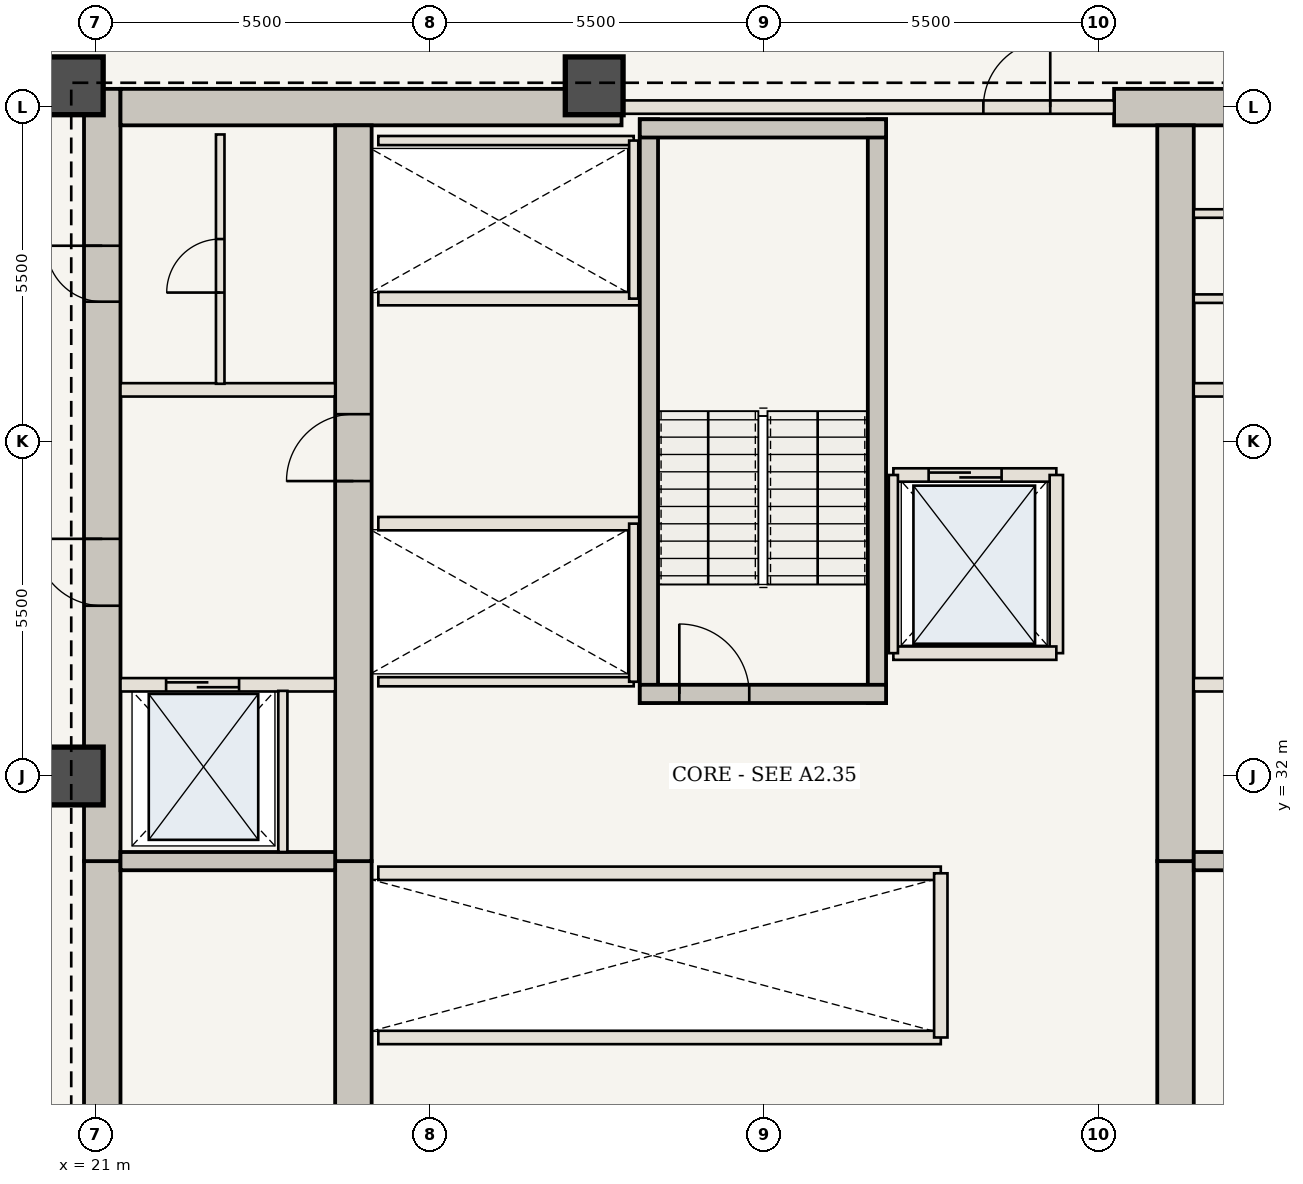
"""IFC4 building model, lengths in metres.
Left out: names, types, materials, properties, quantities, classifications, styles, units other than length and angle.
Written with IfcOpenShell. Run it as: python <this file> out.ifc"""

import sys

from ifc_helpers import new_model, si_unit, direction, frame, frame_2d, origin, origin_2d, place, context, subcontext, project, spatial, rectangle, extrude, element, fill, save


model = new_model("IFC4")
c1 = context("Model", 3, precision=1e-05, world=origin(), true_north=direction((0.0, 1.0)))
c2 = subcontext(c1, "Body", "Model", "MODEL_VIEW")
j1 = project(units=[si_unit("LENGTHUNIT", "METRE"), si_unit("PLANEANGLEUNIT", "RADIAN")], contexts=[c1])
p1 = place(None, origin())
s1 = spatial("IfcSite", under=j1, at=p1, CompositionType="ELEMENT")
p2 = place(p1, origin())
s2 = spatial("IfcBuilding", under=s1, at=p2, CompositionType="ELEMENT")
p3 = place(p2, frame((0.0, 0.0, 152.95)))
s3 = spatial("IfcBuildingStorey", under=s2, at=p3, CompositionType="ELEMENT", Elevation=152.95)
p4 = place(p3, frame((21.11, 20.65, 0.0), z_axis=(0.0, 0.0, 1.0), x_axis=(0.0, 1.0, 0.0)))
e1 = element("IfcWall", 1, at=p4, inside=s3, PredefinedType="SHEAR", context=c2, shape_type="SweptSolid", body=[
    extrude(rectangle(XDim=9.95, YDim=0.6, at=frame_2d((4.975, 0.0))), origin(), (0.0, 0.0, 1.0), 3.85),
])
p5 = place(p4, frame((1.1, 0.0, 0.0)))
e2 = element("IfcOpeningElement", 2, at=p5, cuts=e1, PredefinedType="OPENING", context=c2, shape_type="SweptSolid", body=[
    extrude(rectangle(XDim=1.15, YDim=2.15, at=frame_2d((0.575, 1.075))), frame((0.0, 0.31, 0.0), z_axis=(0.0, -1.0, 0.0), x_axis=(1.0, 0.0, 0.0)), (0.0, 0.0, 1.0), 0.62),
])
p6 = place(p3, frame((21.11, 30.6, 0.0), z_axis=(0.0, 0.0, 1.0), x_axis=(0.0, 1.0, 0.0)))
e3 = element("IfcWall", 3, at=p6, inside=s3, PredefinedType="SHEAR", context=c2, shape_type="SweptSolid", body=[
    extrude(rectangle(XDim=12.7, YDim=0.6, at=frame_2d((6.35, 0.0))), origin(), (0.0, 0.0, 1.0), 3.85),
])
p7 = place(p6, frame((4.2, 0.0, 0.0)))
e4 = element("IfcOpeningElement", 4, at=p7, cuts=e3, PredefinedType="OPENING", context=c2, shape_type="SweptSolid", body=[
    extrude(rectangle(XDim=1.1, YDim=2.15, at=frame_2d((0.55, 1.075))), frame((0.0, 0.31, 0.0), z_axis=(0.0, -1.0, 0.0), x_axis=(1.0, 0.0, 0.0)), (0.0, 0.0, 1.0), 0.62),
])
p8 = place(p6, frame((9.2, 0.0, 0.0)))
e5 = element("IfcOpeningElement", 5, at=p8, cuts=e3, PredefinedType="OPENING", context=c2, shape_type="SweptSolid", body=[
    extrude(rectangle(XDim=0.92, YDim=2.1, at=frame_2d((0.46, 1.05))), frame((0.0, 0.31, 0.0), z_axis=(0.0, -1.0, 0.0), x_axis=(1.0, 0.0, 0.0)), (0.0, 0.0, 1.0), 0.62),
])
p9 = place(p3, frame((21.41, 43.0, 0.0), z_axis=(0.0, 0.0, 1.0), x_axis=(1.0, 0.0, 0.0)))
e6 = element("IfcWall", 6, at=p9, inside=s3, PredefinedType="SHEAR", context=c2, shape_type="SweptSolid", body=[
    extrude(rectangle(XDim=8.24, YDim=0.6, at=frame_2d((4.12, 0.0))), origin(), (0.0, 0.0, 1.0), 3.85),
])
p10 = place(p3, frame((37.75, 43.0, 0.0), z_axis=(0.0, 0.0, 1.0), x_axis=(1.0, 0.0, 0.0)))
e7 = element("IfcWall", 7, at=p10, inside=s3, PredefinedType="SHEAR", context=c2, shape_type="SweptSolid", body=[
    extrude(rectangle(XDim=4.84, YDim=0.6, at=frame_2d((2.42, 0.0))), origin(), (0.0, 0.0, 1.0), 3.85),
])
p11 = place(p3, frame((25.24, 21.25, 0.0), z_axis=(0.0, 0.0, 1.0), x_axis=(0.0, 1.0, 0.0)))
e8 = element("IfcWall", 8, at=p11, inside=s3, PredefinedType="SHEAR", context=c2, shape_type="SweptSolid", body=[
    extrude(rectangle(XDim=9.35, YDim=0.6, at=frame_2d((4.675, 0.0))), origin(), (0.0, 0.0, 1.0), 3.85),
])
p12 = place(p3, frame((25.24, 30.6, 0.0), z_axis=(0.0, 0.0, 1.0), x_axis=(0.0, 1.0, 0.0)))
e9 = element("IfcWall", 9, at=p12, inside=s3, PredefinedType="SHEAR", context=c2, shape_type="SweptSolid", body=[
    extrude(rectangle(XDim=12.1, YDim=0.6, at=frame_2d((6.05, 0.0))), origin(), (0.0, 0.0, 1.0), 3.85),
])
p13 = place(p12, frame((6.25, 0.0, 0.0)))
e10 = element("IfcOpeningElement", 10, at=p13, cuts=e9, PredefinedType="OPENING", context=c2, shape_type="SweptSolid", body=[
    extrude(rectangle(XDim=1.1, YDim=2.15, at=frame_2d((0.55, 1.075))), frame((0.0, 0.31, 0.0), z_axis=(0.0, -1.0, 0.0), x_axis=(1.0, 0.0, 0.0)), (0.0, 0.0, 1.0), 0.62),
])
p14 = place(p3, frame((38.76, 21.25, 0.0), z_axis=(0.0, 0.0, 1.0), x_axis=(0.0, 1.0, 0.0)))
e11 = element("IfcWall", 11, at=p14, inside=s3, PredefinedType="SHEAR", context=c2, shape_type="SweptSolid", body=[
    extrude(rectangle(XDim=9.35, YDim=0.6, at=frame_2d((4.675, 0.0))), origin(), (0.0, 0.0, 1.0), 3.85),
])
p15 = place(p3, frame((38.76, 30.6, 0.0), z_axis=(0.0, 0.0, 1.0), x_axis=(0.0, 1.0, 0.0)))
e12 = element("IfcWall", 12, at=p15, inside=s3, PredefinedType="SHEAR", context=c2, shape_type="SweptSolid", body=[
    extrude(rectangle(XDim=12.1, YDim=0.6, at=frame_2d((6.05, 0.0))), origin(), (0.0, 0.0, 1.0), 3.85),
])
for number, where, z_axis, x_axis in (
    (13, (29.2, 43.35, 0.0), (0.0, 0.0, 1.0), (1.0, 0.0, 0.0)),
    (14, (20.65, 43.35, 0.0), (0.0, 0.0, 1.0), (1.0, 0.0, 0.0)),
    (15, (20.65, 32.0, 0.0), (0.0, 0.0, 1.0), (1.0, 0.0, 0.0)),
):
    element("IfcColumn", number, at=place(p3, frame(where, z_axis=z_axis, x_axis=x_axis)), inside=s3, PredefinedType="COLUMN", context=c2, shape_type="SweptSolid", body=[
        extrude(rectangle(XDim=0.95, YDim=0.95, at=origin_2d()), origin(), (0.0, 0.0, 1.0), 3.85),
    ])
for number, where, z_axis, x_axis in (
    (16, (21.41, 30.6, 0.0), (0.0, 0.0, 1.0), (1.0, 0.0, 0.0)),
    (17, (39.06, 30.6, 0.0), (0.0, 0.0, 1.0), (1.0, 0.0, 0.0)),
):
    element("IfcWall", number, at=place(p3, frame(where, z_axis=z_axis, x_axis=x_axis)), inside=s3, PredefinedType="SHEAR", context=c2, shape_type="SweptSolid", body=[
        extrude(rectangle(XDim=3.53, YDim=0.3, at=frame_2d((1.765, 0.0))), origin(), (0.0, 0.0, 1.0), 3.685),
    ])
p16 = place(p3, frame((21.41, 33.5, 0.0), z_axis=(0.0, 0.0, 1.0), x_axis=(1.0, 0.0, 0.0)))
e18 = element("IfcWall", 18, at=p16, inside=s3, PredefinedType="STANDARD", context=c2, shape_type="SweptSolid", body=[
    extrude(rectangle(XDim=3.53, YDim=0.22, at=frame_2d((1.765, 0.0))), origin(), (0.0, 0.0, 1.0), 3.685),
])
p17 = place(p16, frame((0.75, 0.0, 0.0)))
e19 = element("IfcOpeningElement", 19, at=p17, cuts=e18, PredefinedType="OPENING", context=c2, shape_type="SweptSolid", body=[
    extrude(rectangle(XDim=1.2, YDim=2.2, at=frame_2d((0.6, 1.1))), frame((0.0, 0.12, 0.0), z_axis=(0.0, -1.0, 0.0), x_axis=(1.0, 0.0, 0.0)), (0.0, 0.0, 1.0), 0.24),
])
p18 = place(p3, frame((24.08, 30.75, 0.0), z_axis=(0.0, 0.0, 1.0), x_axis=(0.0, 1.0, 0.0)))
e20 = element("IfcWall", 20, at=p18, inside=s3, PredefinedType="STANDARD", context=c2, shape_type="SweptSolid", body=[
    extrude(rectangle(XDim=2.65, YDim=0.15, at=frame_2d((1.325, 0.0))), origin(), (0.0, 0.0, 1.0), 3.685),
])
p19 = place(p3, frame((39.06, 33.5, 0.0), z_axis=(0.0, 0.0, 1.0), x_axis=(1.0, 0.0, 0.0)))
e21 = element("IfcWall", 21, at=p19, inside=s3, PredefinedType="STANDARD", context=c2, shape_type="SweptSolid", body=[
    extrude(rectangle(XDim=3.53, YDim=0.22, at=frame_2d((1.765, 0.0))), origin(), (0.0, 0.0, 1.0), 3.685),
])
p20 = place(p19, frame((1.55, 0.0, 0.0)))
e22 = element("IfcOpeningElement", 22, at=p20, cuts=e21, PredefinedType="OPENING", context=c2, shape_type="SweptSolid", body=[
    extrude(rectangle(XDim=1.2, YDim=2.2, at=frame_2d((0.6, 1.1))), frame((0.0, 0.12, 0.0), z_axis=(0.0, -1.0, 0.0), x_axis=(1.0, 0.0, 0.0)), (0.0, 0.0, 1.0), 0.24),
])
for number, where, z_axis, x_axis in (
    (23, (21.41, 38.35, 0.0), (0.0, 0.0, 1.0), (1.0, 0.0, 0.0)),
    (24, (39.06, 38.35, 0.0), (0.0, 0.0, 1.0), (1.0, 0.0, 0.0)),
):
    element("IfcWall", number, at=place(p3, frame(where, z_axis=z_axis, x_axis=x_axis)), inside=s3, PredefinedType="STANDARD", context=c2, shape_type="SweptSolid", body=[
        extrude(rectangle(XDim=3.53, YDim=0.22, at=frame_2d((1.765, 0.0))), origin(), (0.0, 0.0, 1.0), 3.685),
    ])
p21 = place(p3, frame((23.05, 38.45, 0.0), z_axis=(0.0, 0.0, 1.0), x_axis=(0.0, 1.0, 0.0)))
e25 = element("IfcWall", 25, at=p21, inside=s3, PredefinedType="STANDARD", context=c2, shape_type="SweptSolid", body=[
    extrude(rectangle(XDim=4.1, YDim=0.14, at=frame_2d((2.05, 0.0))), origin(), (0.0, 0.0, 1.0), 3.685),
])
p22 = place(p21, frame((1.5, 0.0, 0.0)))
e26 = element("IfcOpeningElement", 26, at=p22, cuts=e25, PredefinedType="OPENING", context=c2, shape_type="SweptSolid", body=[
    extrude(rectangle(XDim=0.88, YDim=2.1, at=frame_2d((0.44, 1.05))), frame((0.0, 0.08, 0.0), z_axis=(0.0, -1.0, 0.0), x_axis=(1.0, 0.0, 0.0)), (0.0, 0.0, 1.0), 0.16),
])
for number, where, z_axis, x_axis in (
    (27, (39.06, 39.85, 0.0), (0.0, 0.0, 1.0), (1.0, 0.0, 0.0)),
    (28, (39.06, 41.25, 0.0), (0.0, 0.0, 1.0), (1.0, 0.0, 0.0)),
):
    element("IfcWall", number, at=place(p3, frame(where, z_axis=z_axis, x_axis=x_axis)), inside=s3, PredefinedType="STANDARD", context=c2, shape_type="SweptSolid", body=[
        extrude(rectangle(XDim=3.53, YDim=0.14, at=frame_2d((1.765, 0.0))), origin(), (0.0, 0.0, 1.0), 3.685),
    ])
for number, where, z_axis, x_axis in (
    (29, (25.65, 27.7, 0.0), (0.0, 0.0, 1.0), (1.0, 0.0, 0.0)),
    (30, (25.65, 30.4, 0.0), (0.0, 0.0, 1.0), (1.0, 0.0, 0.0)),
):
    element("IfcWall", number, at=place(p3, frame(where, z_axis=z_axis, x_axis=x_axis)), inside=s3, PredefinedType="STANDARD", context=c2, shape_type="SweptSolid", body=[
        extrude(rectangle(XDim=9.25, YDim=0.22, at=frame_2d((4.625, 0.0))), origin(), (0.0, 0.0, 1.0), 3.685),
    ])
p23 = place(p3, frame((34.9, 27.7, 0.0), z_axis=(0.0, 0.0, 1.0), x_axis=(0.0, 1.0, 0.0)))
e31 = element("IfcWall", 31, at=p23, inside=s3, PredefinedType="STANDARD", context=c2, shape_type="SweptSolid", body=[
    extrude(rectangle(XDim=2.7, YDim=0.22, at=frame_2d((1.35, 0.0))), origin(), (0.0, 0.0, 1.0), 3.685),
])
p24 = place(p3, frame((25.65, 36.15, 0.0), z_axis=(0.0, 0.0, 1.0), x_axis=(1.0, 0.0, 0.0)))
e32 = element("IfcWall", 32, at=p24, inside=s3, PredefinedType="STANDARD", context=c2, shape_type="SweptSolid", body=[
    extrude(rectangle(XDim=4.3, YDim=0.22, at=frame_2d((2.15, 0.0))), origin(), (0.0, 0.0, 1.0), 3.685),
])
p25 = place(p3, frame((25.65, 33.55, 0.0), z_axis=(0.0, 0.0, 1.0), x_axis=(1.0, 0.0, 0.0)))
e33 = element("IfcWall", 33, at=p25, inside=s3, PredefinedType="STANDARD", context=c2, shape_type="SweptSolid", body=[
    extrude(rectangle(XDim=4.2, YDim=0.15, at=frame_2d((2.1, 0.0))), origin(), (0.0, 0.0, 1.0), 3.685),
])
p26 = place(p3, frame((29.85, 33.55, 0.0), z_axis=(0.0, 0.0, 1.0), x_axis=(0.0, 1.0, 0.0)))
e34 = element("IfcWall", 34, at=p26, inside=s3, PredefinedType="STANDARD", context=c2, shape_type="SweptSolid", body=[
    extrude(rectangle(XDim=2.6, YDim=0.15, at=frame_2d((1.3, 0.0))), origin(), (0.0, 0.0, 1.0), 3.685),
])
p27 = place(p3, frame((25.65, 39.85, 0.0), z_axis=(0.0, 0.0, 1.0), x_axis=(1.0, 0.0, 0.0)))
e35 = element("IfcWall", 35, at=p27, inside=s3, PredefinedType="STANDARD", context=c2, shape_type="SweptSolid", body=[
    extrude(rectangle(XDim=4.3, YDim=0.22, at=frame_2d((2.15, 0.0))), origin(), (0.0, 0.0, 1.0), 3.685),
])
p28 = place(p3, frame((25.65, 42.45, 0.0), z_axis=(0.0, 0.0, 1.0), x_axis=(1.0, 0.0, 0.0)))
e36 = element("IfcWall", 36, at=p28, inside=s3, PredefinedType="STANDARD", context=c2, shape_type="SweptSolid", body=[
    extrude(rectangle(XDim=4.2, YDim=0.15, at=frame_2d((2.1, 0.0))), origin(), (0.0, 0.0, 1.0), 3.685),
])
p29 = place(p3, frame((29.85, 39.85, 0.0), z_axis=(0.0, 0.0, 1.0), x_axis=(0.0, 1.0, 0.0)))
e37 = element("IfcWall", 37, at=p29, inside=s3, PredefinedType="STANDARD", context=c2, shape_type="SweptSolid", body=[
    extrude(rectangle(XDim=2.6, YDim=0.15, at=frame_2d((1.3, 0.0))), origin(), (0.0, 0.0, 1.0), 3.685),
])
for number, where, z_axis, x_axis in (
    (38, (30.1, 33.2, 0.0), (0.0, 0.0, 1.0), (0.0, 1.0, 0.0)),
    (39, (33.85, 33.2, 0.0), (0.0, 0.0, 1.0), (0.0, 1.0, 0.0)),
):
    element("IfcWall", number, at=place(p3, frame(where, z_axis=z_axis, x_axis=x_axis)), inside=s3, PredefinedType="SHEAR", context=c2, shape_type="SweptSolid", body=[
        extrude(rectangle(XDim=9.6, YDim=0.3, at=frame_2d((4.8, 0.0))), origin(), (0.0, 0.0, 1.0), 3.685),
    ])
p30 = place(p3, frame((29.95, 33.35, 0.0), z_axis=(0.0, 0.0, 1.0), x_axis=(1.0, 0.0, 0.0)))
e40 = element("IfcWall", 40, at=p30, inside=s3, PredefinedType="SHEAR", context=c2, shape_type="SweptSolid", body=[
    extrude(rectangle(XDim=4.05, YDim=0.3, at=frame_2d((2.025, 0.0))), origin(), (0.0, 0.0, 1.0), 3.685),
])
p31 = place(p30, frame((0.65, 0.0, 0.0)))
e41 = element("IfcOpeningElement", 41, at=p31, cuts=e40, PredefinedType="OPENING", context=c2, shape_type="SweptSolid", body=[
    extrude(rectangle(XDim=1.15, YDim=2.15, at=frame_2d((0.575, 1.075))), frame((0.0, 0.16, 0.0), z_axis=(0.0, -1.0, 0.0), x_axis=(1.0, 0.0, 0.0)), (0.0, 0.0, 1.0), 0.32),
])
p32 = place(p3, frame((29.95, 42.65, 0.0), z_axis=(0.0, 0.0, 1.0), x_axis=(1.0, 0.0, 0.0)))
e42 = element("IfcWall", 42, at=p32, inside=s3, PredefinedType="SHEAR", context=c2, shape_type="SweptSolid", body=[
    extrude(rectangle(XDim=4.05, YDim=0.3, at=frame_2d((2.025, 0.0))), origin(), (0.0, 0.0, 1.0), 3.685),
])
p33 = place(p3, frame((29.65, 43.0, 0.0), z_axis=(0.0, 0.0, 1.0), x_axis=(1.0, 0.0, 0.0)))
e43 = element("IfcWall", 43, at=p33, inside=s3, PredefinedType="STANDARD", context=c2, shape_type="SweptSolid", body=[
    extrude(rectangle(XDim=8.1, YDim=0.22, at=frame_2d((4.05, 0.0))), origin(), (0.0, 0.0, 1.0), 3.685),
])
p34 = place(p33, frame((5.95, 0.0, 0.0)))
e44 = element("IfcOpeningElement", 44, at=p34, cuts=e43, PredefinedType="OPENING", context=c2, shape_type="SweptSolid", body=[
    extrude(rectangle(XDim=1.1, YDim=2.15, at=frame_2d((0.55, 1.075))), frame((0.0, 0.12, 0.0), z_axis=(0.0, -1.0, 0.0), x_axis=(1.0, 0.0, 0.0)), (0.0, 0.0, 1.0), 0.24),
])
p35 = place(p3, frame((34.12, 36.95, 0.0), z_axis=(0.0, 0.0, 1.0), x_axis=(1.0, 0.0, 0.0)))
e45 = element("IfcWall", 45, at=p35, inside=s3, PredefinedType="STANDARD", context=c2, shape_type="SweptSolid", body=[
    extrude(rectangle(XDim=2.68, YDim=0.22, at=frame_2d((1.34, 0.0))), origin(), (0.0, 0.0, 1.0), 3.685),
])
p36 = place(p35, frame((0.58, 0.0, 0.0)))
e46 = element("IfcOpeningElement", 46, at=p36, cuts=e45, PredefinedType="OPENING", context=c2, shape_type="SweptSolid", body=[
    extrude(rectangle(XDim=1.2, YDim=2.2, at=frame_2d((0.6, 1.1))), frame((0.0, 0.12, 0.0), z_axis=(0.0, -1.0, 0.0), x_axis=(1.0, 0.0, 0.0)), (0.0, 0.0, 1.0), 0.24),
])
p37 = place(p3, frame((36.8, 34.02, 0.0), z_axis=(0.0, 0.0, 1.0), x_axis=(0.0, 1.0, 0.0)))
e47 = element("IfcWall", 47, at=p37, inside=s3, PredefinedType="STANDARD", context=c2, shape_type="SweptSolid", body=[
    extrude(rectangle(XDim=2.93, YDim=0.22, at=frame_2d((1.465, 0.0))), origin(), (0.0, 0.0, 1.0), 3.685),
])
p38 = place(p3, frame((34.12, 34.02, 0.0), z_axis=(0.0, 0.0, 1.0), x_axis=(1.0, 0.0, 0.0)))
e48 = element("IfcWall", 48, at=p38, inside=s3, PredefinedType="STANDARD", context=c2, shape_type="SweptSolid", body=[
    extrude(rectangle(XDim=2.68, YDim=0.22, at=frame_2d((1.34, 0.0))), origin(), (0.0, 0.0, 1.0), 3.685),
])
p39 = place(p3, frame((34.12, 34.02, 0.0), z_axis=(0.0, 0.0, 1.0), x_axis=(0.0, 1.0, 0.0)))
e49 = element("IfcWall", 49, at=p39, inside=s3, PredefinedType="STANDARD", context=c2, shape_type="SweptSolid", body=[
    extrude(rectangle(XDim=2.93, YDim=0.15, at=frame_2d((1.465, 0.0))), origin(), (0.0, 0.0, 1.0), 3.685),
])
p40 = place(p7, origin())
e50 = element("IfcDoor", 50, at=p40, inside=s3, OperationType="SINGLE_SWING_RIGHT", PredefinedType="DOOR", context=c2, shape_type="SweptSolid", body=[
    extrude(rectangle(XDim=1.1, YDim=2.15, at=frame_2d((0.55, 1.075))), frame((0.0, 0.025, 0.0), z_axis=(0.0, -1.0, 0.0), x_axis=(1.0, 0.0, 0.0)), (0.0, 0.0, 1.0), 0.05),
])
fill(e4, e50)
p41 = place(p13, origin())
e51 = element("IfcDoor", 51, at=p41, inside=s3, OperationType="SINGLE_SWING_LEFT", PredefinedType="DOOR", context=c2, shape_type="SweptSolid", body=[
    extrude(rectangle(XDim=1.1, YDim=2.15, at=frame_2d((0.55, 1.075))), frame((0.0, 0.025, 0.0), z_axis=(0.0, -1.0, 0.0), x_axis=(1.0, 0.0, 0.0)), (0.0, 0.0, 1.0), 0.05),
])
fill(e10, e51)
p42 = place(p8, origin())
e52 = element("IfcDoor", 52, at=p42, inside=s3, OperationType="SINGLE_SWING_RIGHT", PredefinedType="DOOR", context=c2, shape_type="SweptSolid", body=[
    extrude(rectangle(XDim=0.92, YDim=2.1, at=frame_2d((0.46, 1.05))), frame((0.0, 0.025, 0.0), z_axis=(0.0, -1.0, 0.0), x_axis=(1.0, 0.0, 0.0)), (0.0, 0.0, 1.0), 0.05),
])
fill(e5, e52)
p43 = place(p17, origin())
e53 = element("IfcDoor", 53, at=p43, inside=s3, OperationType="DOUBLE_DOOR_SLIDING", PredefinedType="DOOR", context=c2, shape_type="SweptSolid", body=[
    extrude(rectangle(XDim=1.2, YDim=2.2, at=frame_2d((0.6, 1.1))), frame((0.0, 0.025, 0.0), z_axis=(0.0, -1.0, 0.0), x_axis=(1.0, 0.0, 0.0)), (0.0, 0.0, 1.0), 0.05),
])
fill(e19, e53)
p44 = place(p22, origin())
e54 = element("IfcDoor", 54, at=p44, inside=s3, OperationType="SINGLE_SWING_LEFT", PredefinedType="DOOR", context=c2, shape_type="SweptSolid", body=[
    extrude(rectangle(XDim=0.88, YDim=2.1, at=frame_2d((0.44, 1.05))), frame((0.0, 0.025, 0.0), z_axis=(0.0, -1.0, 0.0), x_axis=(1.0, 0.0, 0.0)), (0.0, 0.0, 1.0), 0.05),
])
fill(e26, e54)
p45 = place(p31, origin())
e55 = element("IfcDoor", 55, at=p45, inside=s3, OperationType="SINGLE_SWING_LEFT", PredefinedType="DOOR", context=c2, shape_type="SweptSolid", body=[
    extrude(rectangle(XDim=1.15, YDim=2.15, at=frame_2d((0.575, 1.075))), frame((0.0, 0.025, 0.0), z_axis=(0.0, -1.0, 0.0), x_axis=(1.0, 0.0, 0.0)), (0.0, 0.0, 1.0), 0.05),
])
fill(e41, e55)
p46 = place(p34, origin())
e56 = element("IfcDoor", 56, at=p46, inside=s3, OperationType="SINGLE_SWING_RIGHT", PredefinedType="DOOR", context=c2, shape_type="SweptSolid", body=[
    extrude(rectangle(XDim=1.1, YDim=2.15, at=frame_2d((0.55, 1.075))), frame((0.0, 0.025, 0.0), z_axis=(0.0, -1.0, 0.0), x_axis=(1.0, 0.0, 0.0)), (0.0, 0.0, 1.0), 0.05),
])
fill(e44, e56)
p47 = place(p36, origin())
e57 = element("IfcDoor", 57, at=p47, inside=s3, OperationType="DOUBLE_DOOR_SLIDING", PredefinedType="DOOR", context=c2, shape_type="SweptSolid", body=[
    extrude(rectangle(XDim=1.2, YDim=2.2, at=frame_2d((0.6, 1.1))), frame((0.0, 0.025, 0.0), z_axis=(0.0, -1.0, 0.0), x_axis=(1.0, 0.0, 0.0)), (0.0, 0.0, 1.0), 0.05),
])
fill(e46, e57)
save(model, sys.argv[1])
